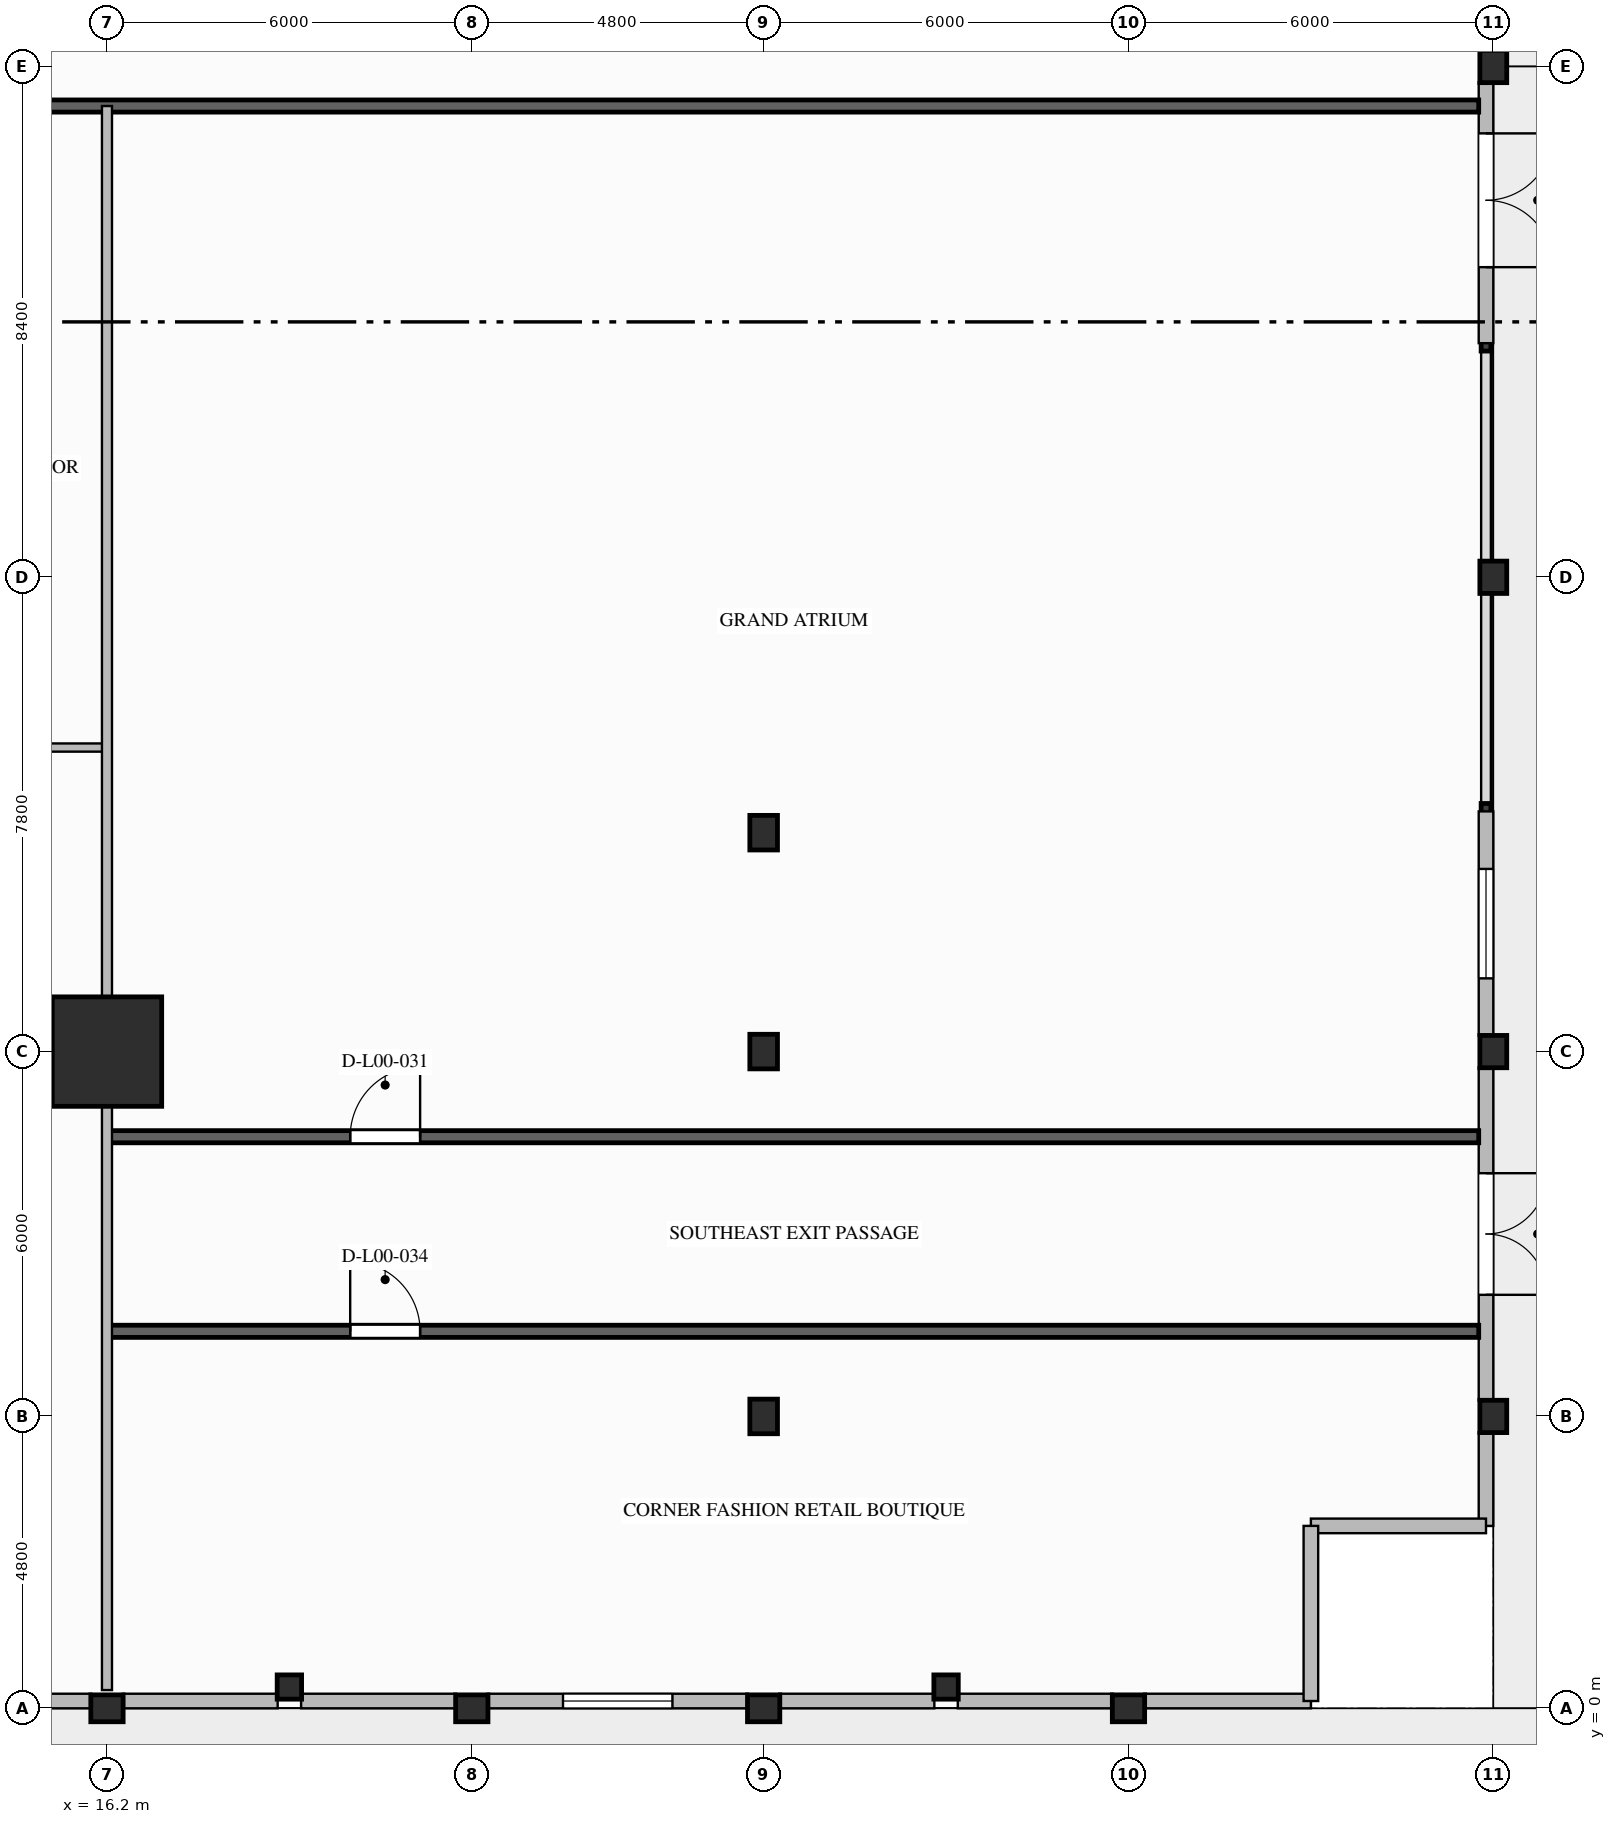
"""IFC4 building model, lengths in metres.
Left out: names, types, materials, properties, quantities, classifications, styles, units other than length and angle.
Written with IfcOpenShell. Run it as: python <this file> out.ifc"""

import sys

from ifc_helpers import new_model, si_unit, direction, frame, frame_2d, origin, origin_2d, place, context, subcontext, project, spatial, rectangle, i_section, extrude, element, fill, save


model = new_model("IFC4")
c1 = context("Model", 3, precision=1e-05, world=origin(), true_north=direction((0.0, 1.0)))
c2 = subcontext(c1, "Body", "Model", "MODEL_VIEW")
j1 = project(units=[si_unit("LENGTHUNIT", "METRE"), si_unit("PLANEANGLEUNIT", "RADIAN")], contexts=[c1])
p1 = place(None, origin())
s1 = spatial("IfcSite", under=j1, at=p1, CompositionType="ELEMENT")
p2 = place(p1, origin())
s2 = spatial("IfcBuilding", under=s1, at=p2, CompositionType="ELEMENT")
p3 = place(p2, origin())
s3 = spatial("IfcBuildingStorey", under=s2, at=p3, CompositionType="ELEMENT", Elevation=0.0)
p4 = place(p3, frame((16.2, 10.8, 0.0), z_axis=(0.0, 0.0, 1.0), x_axis=(1.0, 0.0, 0.0)))
e1 = element("IfcColumn", 1, at=p4, inside=s3, PredefinedType="COLUMN", context=c2, shape_type="SweptSolid", body=[
    extrude(rectangle(XDim=1.8, YDim=1.8, at=origin_2d()), origin(), (0.0, 0.0, 1.0), 5.6),
])
for number, where, z_axis, x_axis in (
    (2, (39.0, 4.8, 0.0), (0.0, 0.0, 1.0), (1.0, 0.0, 0.0)),
    (3, (39.0, 10.8, 0.0), (0.0, 0.0, 1.0), (1.0, 0.0, 0.0)),
    (4, (39.0, 18.6, 0.0), (0.0, 0.0, 1.0), (1.0, 0.0, 0.0)),
    (5, (39.0, 27.0, 0.0), (0.0, 0.0, 1.0), (1.0, 0.0, 0.0)),
    (6, (16.2, 0.0, 0.0), (0.0, 0.0, 1.0), (0.0, 1.0, 0.0)),
    (7, (22.2, 0.0, 0.0), (0.0, 0.0, 1.0), (0.0, 1.0, 0.0)),
    (8, (27.0, 0.0, 0.0), (0.0, 0.0, 1.0), (0.0, 1.0, 0.0)),
    (9, (33.0, 0.0, 0.0), (0.0, 0.0, 1.0), (0.0, 1.0, 0.0)),
):
    element("IfcColumn", number, at=place(p3, frame(where, z_axis=z_axis, x_axis=x_axis)), inside=s3, PredefinedType="COLUMN", context=c2, shape_type="SweptSolid", body=[
        extrude(i_section(OverallWidth=0.442, OverallDepth=0.531, WebThickness=0.066, FlangeThickness=0.106, FilletRadius=0.03, at=origin_2d()), origin(), (0.0, 0.0, 1.0), 5.6),
    ])
for number, where, z_axis, x_axis in (
    (10, (27.0, 4.8, 0.0), (0.0, 0.0, 1.0), (1.0, 0.0, 0.0)),
    (11, (27.0, 10.8, 0.0), (0.0, 0.0, 1.0), (1.0, 0.0, 0.0)),
    (12, (27.0, 14.4, 0.0), (0.0, 0.0, 1.0), (1.0, 0.0, 0.0)),
):
    element("IfcColumn", number, at=place(p3, frame(where, z_axis=z_axis, x_axis=x_axis)), inside=s3, PredefinedType="COLUMN", context=c2, shape_type="SweptSolid", body=[
        extrude(i_section(OverallWidth=0.454, OverallDepth=0.569, WebThickness=0.078, FlangeThickness=0.125, FilletRadius=0.03, at=origin_2d()), origin(), (0.0, 0.0, 1.0), 5.6),
    ])
for number, where, z_axis, x_axis in (
    (13, (19.2, 0.35, 0.0), (0.0, 0.0, 1.0), (1.0, 0.0, 0.0)),
    (14, (30.0, 0.35, 0.0), (0.0, 0.0, 1.0), (1.0, 0.0, 0.0)),
):
    element("IfcColumn", number, at=place(p3, frame(where, z_axis=z_axis, x_axis=x_axis)), inside=s3, PredefinedType="COLUMN", context=c2, shape_type="SweptSolid", body=[
        extrude(i_section(OverallWidth=0.401, OverallDepth=0.399, WebThickness=0.025, FlangeThickness=0.04, FilletRadius=0.025, at=origin_2d()), origin(), (0.0, 0.0, 1.0), 5.6),
    ])
p5 = place(p3, frame((38.88, 4.542, 0.0), z_axis=(0.0, 0.0, 1.0), x_axis=(0.0, -1.0, 0.0)))
e15 = element("IfcWall", 15, at=p5, inside=s3, PredefinedType="STANDARD", context=c2, shape_type="SweptSolid", body=[
    extrude(rectangle(XDim=1.542, YDim=0.24, at=frame_2d((0.771, 0.0))), origin(), (0.0, 0.0, 1.0), 5.3),
])
p6 = place(p3, frame((38.88, 10.542, 0.0), z_axis=(0.0, 0.0, 1.0), x_axis=(0.0, -1.0, 0.0)))
e16 = element("IfcWall", 16, at=p6, inside=s3, PredefinedType="STANDARD", context=c2, shape_type="SweptSolid", body=[
    extrude(rectangle(XDim=5.485, YDim=0.24, at=frame_2d((2.742, 0.0))), origin(), (0.0, 0.0, 1.0), 4.604),
])
p7 = place(p6, frame((1.742, 0.0, 0.0)))
e17 = element("IfcOpeningElement", 17, at=p7, cuts=e16, PredefinedType="OPENING", context=c2, shape_type="SweptSolid", body=[
    extrude(rectangle(XDim=2.0, YDim=2.4, at=frame_2d((1.0, 1.2))), frame((0.0, 0.13, 0.0), z_axis=(0.0, -1.0, 0.0), x_axis=(1.0, 0.0, 0.0)), (0.0, 0.0, 1.0), 0.26),
])
p8 = place(p3, frame((38.88, 14.75, 0.0), z_axis=(0.0, 0.0, 1.0), x_axis=(0.0, -1.0, 0.0)))
e18 = element("IfcWall", 18, at=p8, inside=s3, PredefinedType="STANDARD", context=c2, shape_type="SweptSolid", body=[
    extrude(rectangle(XDim=3.692, YDim=0.24, at=frame_2d((1.846, 0.0))), origin(), (0.0, 0.0, 1.0), 4.604),
])
p9 = place(p8, frame((0.946, 0.0, 0.9)))
e19 = element("IfcOpeningElement", 19, at=p9, cuts=e18, PredefinedType="OPENING", context=c2, shape_type="SweptSolid", body=[
    extrude(rectangle(XDim=1.8, YDim=2.4, at=frame_2d((0.9, 1.2))), frame((0.0, 0.13, 0.0), z_axis=(0.0, -1.0, 0.0), x_axis=(1.0, 0.0, 0.0)), (0.0, 0.0, 1.0), 0.26),
])
p10 = place(p3, frame((38.88, 26.742, 0.0), z_axis=(0.0, 0.0, 1.0), x_axis=(0.0, -1.0, 0.0)))
e20 = element("IfcWall", 20, at=p10, inside=s3, PredefinedType="STANDARD", context=c2, shape_type="SweptSolid", body=[
    extrude(rectangle(XDim=4.292, YDim=0.24, at=frame_2d((2.146, 0.0))), origin(), (0.0, 0.0, 1.0), 4.604),
])
p11 = place(p10, frame((0.842, 0.0, 0.0)))
e21 = element("IfcOpeningElement", 21, at=p11, cuts=e20, PredefinedType="OPENING", context=c2, shape_type="SweptSolid", body=[
    extrude(rectangle(XDim=2.2, YDim=2.6, at=frame_2d((1.1, 1.3))), frame((0.0, 0.13, 0.0), z_axis=(0.0, -1.0, 0.0), x_axis=(1.0, 0.0, 0.0)), (0.0, 0.0, 1.0), 0.26),
])
p12 = place(p3, frame((15.942, 0.12, 0.0), z_axis=(0.0, 0.0, 1.0), x_axis=(-1.0, 0.0, 0.0)))
e22 = element("IfcWall", 22, at=p12, inside=s3, PredefinedType="STANDARD", context=c2, shape_type="SweptSolid", body=[
    extrude(rectangle(XDim=3.45, YDim=0.24, at=frame_2d((1.725, 0.0))), origin(), (0.0, 0.0, 1.0), 4.604),
])
p13 = place(p12, frame((0.825, 0.0, 0.65)))
e23 = element("IfcOpeningElement", 23, at=p13, cuts=e22, PredefinedType="OPENING", context=c2, shape_type="SweptSolid", body=[
    extrude(rectangle(XDim=1.8, YDim=2.2, at=frame_2d((0.9, 1.1))), frame((0.0, 0.13, 0.0), z_axis=(0.0, -1.0, 0.0), x_axis=(1.0, 0.0, 0.0)), (0.0, 0.0, 1.0), 0.26),
])
p14 = place(p3, frame((19.007, 0.12, 0.0), z_axis=(0.0, 0.0, 1.0), x_axis=(-1.0, 0.0, 0.0)))
e24 = element("IfcWall", 24, at=p14, inside=s3, PredefinedType="STANDARD", context=c2, shape_type="SweptSolid", body=[
    extrude(rectangle(XDim=2.55, YDim=0.24, at=frame_2d((1.275, 0.0))), origin(), (0.0, 0.0, 1.0), 4.604),
])
p15 = place(p3, frame((21.942, 0.12, 0.0), z_axis=(0.0, 0.0, 1.0), x_axis=(-1.0, 0.0, 0.0)))
e25 = element("IfcWall", 25, at=p15, inside=s3, PredefinedType="STANDARD", context=c2, shape_type="SweptSolid", body=[
    extrude(rectangle(XDim=2.55, YDim=0.24, at=frame_2d((1.275, 0.0))), origin(), (0.0, 0.0, 1.0), 4.604),
])
p16 = place(p3, frame((26.742, 0.12, 0.0), z_axis=(0.0, 0.0, 1.0), x_axis=(-1.0, 0.0, 0.0)))
e26 = element("IfcWall", 26, at=p16, inside=s3, PredefinedType="STANDARD", context=c2, shape_type="SweptSolid", body=[
    extrude(rectangle(XDim=4.284, YDim=0.24, at=frame_2d((2.142, 0.0))), origin(), (0.0, 0.0, 1.0), 4.604),
])
p17 = place(p16, frame((1.242, 0.0, 0.65)))
e27 = element("IfcOpeningElement", 27, at=p17, cuts=e26, PredefinedType="OPENING", context=c2, shape_type="SweptSolid", body=[
    extrude(rectangle(XDim=1.8, YDim=2.2, at=frame_2d((0.9, 1.1))), frame((0.0, 0.13, 0.0), z_axis=(0.0, -1.0, 0.0), x_axis=(1.0, 0.0, 0.0)), (0.0, 0.0, 1.0), 0.26),
])
for number, where, z_axis, x_axis in (
    (28, (29.807, 0.12, 0.0), (0.0, 0.0, 1.0), (-1.0, 0.0, 0.0)),
    (29, (32.742, 0.12, 0.0), (0.0, 0.0, 1.0), (-1.0, 0.0, 0.0)),
):
    element("IfcWall", number, at=place(p3, frame(where, z_axis=z_axis, x_axis=x_axis)), inside=s3, PredefinedType="STANDARD", context=c2, shape_type="SweptSolid", body=[
        extrude(rectangle(XDim=2.55, YDim=0.24, at=frame_2d((1.275, 0.0))), origin(), (0.0, 0.0, 1.0), 4.604),
    ])
p18 = place(p3, frame((36.0, 0.12, 0.0), z_axis=(0.0, 0.0, 1.0), x_axis=(-1.0, 0.0, 0.0)))
e30 = element("IfcWall", 30, at=p18, inside=s3, PredefinedType="STANDARD", context=c2, shape_type="SweptSolid", body=[
    extrude(rectangle(XDim=2.742, YDim=0.24, at=frame_2d((1.371, 0.0))), origin(), (0.0, 0.0, 1.0), 5.3),
])
for number, where, z_axis, x_axis in (
    (31, (38.88, 3.0, 0.0), (0.0, 0.0, 1.0), (-1.0, 0.0, 0.0)),
    (32, (36.0, 3.0, 0.0), (0.0, 0.0, 1.0), (0.0, -1.0, 0.0)),
):
    element("IfcWall", number, at=place(p3, frame(where, z_axis=z_axis, x_axis=x_axis)), inside=s3, PredefinedType="STANDARD", context=c2, shape_type="SweptSolid", body=[
        extrude(rectangle(XDim=2.88, YDim=0.24, at=frame_2d((1.44, 0.0))), origin(), (0.0, 0.0, 1.0), 5.3),
    ])
p19 = place(p3, frame((8.7, 26.35, 0.0), z_axis=(0.0, 0.0, 1.0), x_axis=(1.0, 0.0, 0.0)))
e33 = element("IfcWall", 33, at=p19, inside=s3, PredefinedType="SOLIDWALL", context=c2, shape_type="SweptSolid", body=[
    extrude(rectangle(XDim=30.06, YDim=0.2, at=frame_2d((15.03, 0.0))), origin(), (0.0, 0.0, 1.0), 5.3),
])
p20 = place(p19, frame((4.0, 0.0, 0.0)))
e34 = element("IfcOpeningElement", 34, at=p20, cuts=e33, PredefinedType="OPENING", context=c2, shape_type="SweptSolid", body=[
    extrude(rectangle(XDim=1.15, YDim=2.15, at=frame_2d((0.575, 1.075))), frame((0.0, 0.11, 0.0), z_axis=(0.0, -1.0, 0.0), x_axis=(1.0, 0.0, 0.0)), (0.0, 0.0, 1.0), 0.22),
])
p21 = place(p3, frame((16.2, 9.4, 0.0), z_axis=(0.0, 0.0, 1.0), x_axis=(1.0, 0.0, 0.0)))
e35 = element("IfcWall", 35, at=p21, inside=s3, PredefinedType="SOLIDWALL", context=c2, shape_type="SweptSolid", body=[
    extrude(rectangle(XDim=22.56, YDim=0.2, at=frame_2d((11.28, 0.0))), origin(), (0.0, 0.0, 1.0), 5.3),
])
p22 = place(p21, frame((4.0, 0.0, 0.0)))
e36 = element("IfcOpeningElement", 36, at=p22, cuts=e35, PredefinedType="OPENING", context=c2, shape_type="SweptSolid", body=[
    extrude(rectangle(XDim=1.15, YDim=2.15, at=frame_2d((0.575, 1.075))), frame((0.0, 0.11, 0.0), z_axis=(0.0, -1.0, 0.0), x_axis=(1.0, 0.0, 0.0)), (0.0, 0.0, 1.0), 0.22),
])
p23 = place(p3, frame((16.2, 6.2, 0.0), z_axis=(0.0, 0.0, 1.0), x_axis=(1.0, 0.0, 0.0)))
e37 = element("IfcWall", 37, at=p23, inside=s3, PredefinedType="SOLIDWALL", context=c2, shape_type="SweptSolid", body=[
    extrude(rectangle(XDim=22.56, YDim=0.2, at=frame_2d((11.28, 0.0))), origin(), (0.0, 0.0, 1.0), 5.3),
])
p24 = place(p23, frame((4.0, 0.0, 0.0)))
e38 = element("IfcOpeningElement", 38, at=p24, cuts=e37, PredefinedType="OPENING", context=c2, shape_type="SweptSolid", body=[
    extrude(rectangle(XDim=1.15, YDim=2.15, at=frame_2d((0.575, 1.075))), frame((0.0, 0.11, 0.0), z_axis=(0.0, -1.0, 0.0), x_axis=(1.0, 0.0, 0.0)), (0.0, 0.0, 1.0), 0.22),
])
p25 = place(p3, frame((-16.2, 15.8, 0.0), z_axis=(0.0, 0.0, 1.0), x_axis=(1.0, 0.0, 0.0)))
e39 = element("IfcWall", 39, at=p25, inside=s3, PredefinedType="PARTITIONING", context=c2, shape_type="SweptSolid", body=[
    extrude(rectangle(XDim=32.4, YDim=0.135, at=frame_2d((16.2, 0.0))), origin(), (0.0, 0.0, 1.0), 5.3),
])
p26 = place(p25, frame((6.5, 0.0, 0.0)))
e40 = element("IfcOpeningElement", 40, at=p26, cuts=e39, PredefinedType="OPENING", context=c2, shape_type="SweptSolid", body=[
    extrude(rectangle(XDim=1.8, YDim=2.35, at=frame_2d((0.9, 1.175))), frame((0.0, 0.077, 0.0), z_axis=(0.0, -1.0, 0.0), x_axis=(1.0, 0.0, 0.0)), (0.0, 0.0, 1.0), 0.155),
])
p27 = place(p25, frame((22.0, 0.0, 0.0)))
e41 = element("IfcOpeningElement", 41, at=p27, cuts=e39, PredefinedType="OPENING", context=c2, shape_type="SweptSolid", body=[
    extrude(rectangle(XDim=1.8, YDim=2.35, at=frame_2d((0.9, 1.175))), frame((0.0, 0.077, 0.0), z_axis=(0.0, -1.0, 0.0), x_axis=(1.0, 0.0, 0.0)), (0.0, 0.0, 1.0), 0.155),
])
p28 = place(p3, frame((16.2, 0.3, 0.0), z_axis=(0.0, 0.0, 1.0), x_axis=(0.0, 1.0, 0.0)))
e42 = element("IfcWall", 42, at=p28, inside=s3, PredefinedType="PARTITIONING", context=c2, shape_type="SweptSolid", body=[
    extrude(rectangle(XDim=26.05, YDim=0.165, at=frame_2d((13.025, 0.0))), origin(), (0.0, 0.0, 1.0), 4.337),
])
p29 = place(p7, origin())
e43 = element("IfcDoor", 43, at=p29, inside=s3, OperationType="DOUBLE_DOOR_SINGLE_SWING", PredefinedType="DOOR", context=c2, shape_type="SweptSolid", body=[
    extrude(rectangle(XDim=2.0, YDim=2.4, at=frame_2d((1.0, 1.2))), frame((0.0, 0.025, 0.0), z_axis=(0.0, -1.0, 0.0), x_axis=(1.0, 0.0, 0.0)), (0.0, 0.0, 1.0), 0.05),
])
fill(e17, e43)
p30 = place(p9, origin())
e44 = element("IfcWindow", 44, at=p30, inside=s3, PartitioningType="SINGLE_PANEL", PredefinedType="WINDOW", context=c2, shape_type="SweptSolid", body=[
    extrude(rectangle(XDim=1.8, YDim=2.4, at=frame_2d((0.9, 1.2))), frame((0.0, 0.03, 0.0), z_axis=(0.0, -1.0, 0.0), x_axis=(1.0, 0.0, 0.0)), (0.0, 0.0, 1.0), 0.06),
])
fill(e19, e44)
p31 = place(p11, origin())
e45 = element("IfcDoor", 45, at=p31, inside=s3, OperationType="DOUBLE_DOOR_SINGLE_SWING", PredefinedType="DOOR", context=c2, shape_type="SweptSolid", body=[
    extrude(rectangle(XDim=2.2, YDim=2.6, at=frame_2d((1.1, 1.3))), frame((0.0, 0.025, 0.0), z_axis=(0.0, -1.0, 0.0), x_axis=(1.0, 0.0, 0.0)), (0.0, 0.0, 1.0), 0.05),
])
fill(e21, e45)
p32 = place(p17, origin())
e46 = element("IfcWindow", 46, at=p32, inside=s3, PartitioningType="SINGLE_PANEL", PredefinedType="WINDOW", context=c2, shape_type="SweptSolid", body=[
    extrude(rectangle(XDim=1.8, YDim=2.2, at=frame_2d((0.9, 1.1))), frame((0.0, 0.03, 0.0), z_axis=(0.0, -1.0, 0.0), x_axis=(1.0, 0.0, 0.0)), (0.0, 0.0, 1.0), 0.06),
])
fill(e27, e46)
p33 = place(p22, origin())
e47 = element("IfcDoor", 47, at=p33, inside=s3, OperationType="SINGLE_SWING_RIGHT", PredefinedType="DOOR", context=c2, shape_type="SweptSolid", body=[
    extrude(rectangle(XDim=1.15, YDim=2.15, at=frame_2d((0.575, 1.075))), frame((0.0, 0.025, 0.0), z_axis=(0.0, -1.0, 0.0), x_axis=(1.0, 0.0, 0.0)), (0.0, 0.0, 1.0), 0.05),
])
fill(e36, e47)
p34 = place(p24, origin())
e48 = element("IfcDoor", 48, at=p34, inside=s3, OperationType="SINGLE_SWING_LEFT", PredefinedType="DOOR", context=c2, shape_type="SweptSolid", body=[
    extrude(rectangle(XDim=1.15, YDim=2.15, at=frame_2d((0.575, 1.075))), frame((0.0, 0.025, 0.0), z_axis=(0.0, -1.0, 0.0), x_axis=(1.0, 0.0, 0.0)), (0.0, 0.0, 1.0), 0.05),
])
fill(e38, e48)
save(model, sys.argv[1])
